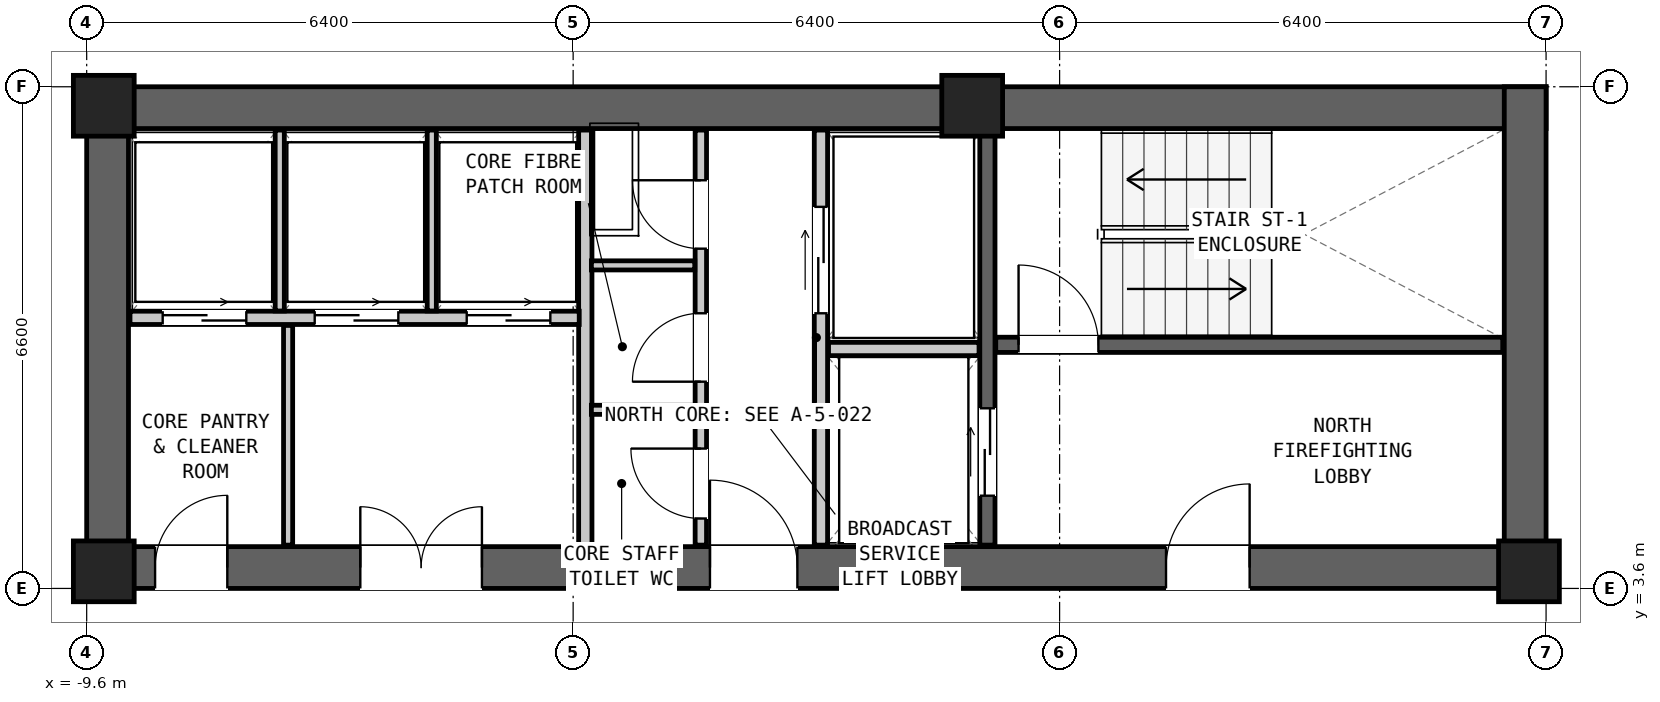
"""IFC4 building model, lengths in metres.
Left out: names, types, materials, properties, quantities, classifications, styles, units other than length and angle.
Written with IfcOpenShell. Run it as: python <this file> out.ifc"""

import sys

from ifc_helpers import new_model, si_unit, direction, frame, frame_2d, origin, origin_2d, place, context, subcontext, project, spatial, rectangle, extrude, element, fill, save


model = new_model("IFC4")
c1 = context("Model", 3, precision=1e-05, world=origin(), true_north=direction((0.0, 1.0)))
c2 = subcontext(c1, "Body", "Model", "MODEL_VIEW")
j1 = project(units=[si_unit("LENGTHUNIT", "METRE"), si_unit("PLANEANGLEUNIT", "RADIAN")], contexts=[c1])
p1 = place(None, origin())
s1 = spatial("IfcSite", under=j1, at=p1, CompositionType="ELEMENT")
p2 = place(p1, origin())
s2 = spatial("IfcBuilding", under=s1, at=p2, CompositionType="ELEMENT")
p3 = place(p2, frame((0.0, 0.0, 69.45)))
s3 = spatial("IfcBuildingStorey", under=s2, at=p3, CompositionType="ELEMENT", Elevation=69.45)
p4 = place(p3, frame((-9.6, 9.925, 0.0), z_axis=(0.0, 0.0, 1.0), x_axis=(1.0, 0.0, 0.0)))
e1 = element("IfcWall", 1, at=p4, inside=s3, PredefinedType="SHEAR", context=c2, shape_type="SweptSolid", body=[
    extrude(rectangle(XDim=19.2, YDim=0.55, at=frame_2d((9.6, 0.0))), origin(), (0.0, 0.0, 1.0), 3.05),
])
p5 = place(p3, frame((-9.6, 3.875, 0.0), z_axis=(0.0, 0.0, 1.0), x_axis=(1.0, 0.0, 0.0)))
e2 = element("IfcWall", 2, at=p5, inside=s3, PredefinedType="SHEAR", context=c2, shape_type="SweptSolid", body=[
    extrude(rectangle(XDim=19.2, YDim=0.55, at=frame_2d((9.6, 0.0))), origin(), (0.0, 0.0, 1.0), 3.05),
])
p6 = place(p5, frame((14.2, 0.0, 0.0)))
e3 = element("IfcOpeningElement", 3, at=p6, cuts=e2, PredefinedType="OPENING", context=c2, shape_type="SweptSolid", body=[
    extrude(rectangle(XDim=1.1, YDim=2.08, at=frame_2d((0.55, 1.04))), frame((0.0, 0.287, 0.0), z_axis=(0.0, -1.0, 0.0), x_axis=(1.0, 0.0, 0.0)), (0.0, 0.0, 1.0), 0.574),
])
p7 = place(p5, frame((8.2, 0.0, 0.0)))
e4 = element("IfcOpeningElement", 4, at=p7, cuts=e2, PredefinedType="OPENING", context=c2, shape_type="SweptSolid", body=[
    extrude(rectangle(XDim=1.15, YDim=2.1, at=frame_2d((0.575, 1.05))), frame((0.0, 0.287, 0.0), z_axis=(0.0, -1.0, 0.0), x_axis=(1.0, 0.0, 0.0)), (0.0, 0.0, 1.0), 0.574),
])
p8 = place(p5, frame((0.9, 0.0, 0.0)))
e5 = element("IfcOpeningElement", 5, at=p8, cuts=e2, PredefinedType="OPENING", context=c2, shape_type="SweptSolid", body=[
    extrude(rectangle(XDim=0.95, YDim=2.1, at=frame_2d((0.475, 1.05))), frame((0.0, 0.287, 0.0), z_axis=(0.0, -1.0, 0.0), x_axis=(1.0, 0.0, 0.0)), (0.0, 0.0, 1.0), 0.574),
])
p9 = place(p5, frame((3.6, 0.0, 0.0)))
e6 = element("IfcOpeningElement", 6, at=p9, cuts=e2, PredefinedType="OPENING", context=c2, shape_type="SweptSolid", body=[
    extrude(rectangle(XDim=1.6, YDim=2.12, at=frame_2d((0.8, 1.06))), frame((0.0, 0.287, 0.0), z_axis=(0.0, -1.0, 0.0), x_axis=(1.0, 0.0, 0.0)), (0.0, 0.0, 1.0), 0.574),
])
for number, where, z_axis, x_axis in (
    (7, (-9.325, 3.6, 0.0), (0.0, 0.0, 1.0), (0.0, 1.0, 0.0)),
    (8, (9.325, 3.6, 0.0), (0.0, 0.0, 1.0), (0.0, 1.0, 0.0)),
):
    element("IfcWall", number, at=place(p3, frame(where, z_axis=z_axis, x_axis=x_axis)), inside=s3, PredefinedType="SHEAR", context=c2, shape_type="SweptSolid", body=[
        extrude(rectangle(XDim=6.6, YDim=0.55, at=frame_2d((3.3, 0.0))), origin(), (0.0, 0.0, 1.0), 3.05),
    ])
for number, where, z_axis, x_axis in (
    (9, (-9.375, 9.95, 0.0), (0.0, 0.0, 1.0), (1.0, 0.0, 0.0)),
    (10, (2.05, 9.95, 0.0), (0.0, 0.0, 1.0), (1.0, 0.0, 0.0)),
    (11, (-9.375, 3.825, 0.0), (0.0, 0.0, 1.0), (1.0, 0.0, 0.0)),
    (12, (9.375, 3.825, 0.0), (0.0, 0.0, 1.0), (1.0, 0.0, 0.0)),
):
    element("IfcColumn", number, at=place(p3, frame(where, z_axis=z_axis, x_axis=x_axis)), inside=s3, PredefinedType="COLUMN", context=c2, shape_type="SweptSolid", body=[
        extrude(rectangle(XDim=0.8, YDim=0.8, at=origin_2d()), origin(), (0.0, 0.0, 1.0), 3.05),
    ])
p10 = place(p3, frame((2.36, 6.805, 0.0), z_axis=(0.0, 0.0, 1.0), x_axis=(1.0, 0.0, 0.0)))
e13 = element("IfcWall", 13, at=p10, inside=s3, PredefinedType="SHEAR", context=c2, shape_type="SweptSolid", body=[
    extrude(rectangle(XDim=6.67, YDim=0.2, at=frame_2d((3.335, 0.0))), origin(), (0.0, 0.0, 1.0), 2.83),
])
p11 = place(p10, frame((0.3, 0.0, 0.0)))
e14 = element("IfcOpeningElement", 14, at=p11, cuts=e13, PredefinedType="OPENING", context=c2, shape_type="SweptSolid", body=[
    extrude(rectangle(XDim=1.05, YDim=2.08, at=frame_2d((0.525, 1.04))), frame((0.0, 0.112, 0.0), z_axis=(0.0, -1.0, 0.0), x_axis=(1.0, 0.0, 0.0)), (0.0, 0.0, 1.0), 0.224),
])
p12 = place(p3, frame((2.25, 4.17, 0.0), z_axis=(0.0, 0.0, 1.0), x_axis=(0.0, 1.0, 0.0)))
e15 = element("IfcWall", 15, at=p12, inside=s3, PredefinedType="SHEAR", context=c2, shape_type="SweptSolid", body=[
    extrude(rectangle(XDim=5.46, YDim=0.2, at=frame_2d((2.73, 0.0))), origin(), (0.0, 0.0, 1.0), 2.83),
])
p13 = place(p12, frame((0.65, 0.0, 0.0)))
e16 = element("IfcOpeningElement", 16, at=p13, cuts=e15, PredefinedType="OPENING", context=c2, shape_type="SweptSolid", body=[
    extrude(rectangle(XDim=1.15, YDim=2.08, at=frame_2d((0.575, 1.04))), frame((0.0, 0.112, 0.0), z_axis=(0.0, -1.0, 0.0), x_axis=(1.0, 0.0, 0.0)), (0.0, 0.0, 1.0), 0.224),
])
p14 = place(p3, frame((0.06, 4.17, 0.0), z_axis=(0.0, 0.0, 1.0), x_axis=(0.0, 1.0, 0.0)))
e17 = element("IfcWall", 17, at=p14, inside=s3, PredefinedType="PARTITIONING", context=c2, shape_type="SweptSolid", body=[
    extrude(rectangle(XDim=5.46, YDim=0.175, at=frame_2d((2.73, 0.0))), origin(), (0.0, 0.0, 1.0), 2.83),
])
p15 = place(p14, frame((3.05, 0.0, 0.0)))
e18 = element("IfcOpeningElement", 18, at=p15, cuts=e17, PredefinedType="OPENING", context=c2, shape_type="SweptSolid", body=[
    extrude(rectangle(XDim=1.4, YDim=2.12, at=frame_2d((0.7, 1.06))), frame((0.0, 0.1, 0.0), z_axis=(0.0, -1.0, 0.0), x_axis=(1.0, 0.0, 0.0)), (0.0, 0.0, 1.0), 0.199),
])
p16 = place(p3, frame((0.16, 6.75, 0.0), z_axis=(0.0, 0.0, 1.0), x_axis=(1.0, 0.0, 0.0)))
e19 = element("IfcWall", 19, at=p16, inside=s3, PredefinedType="PARTITIONING", context=c2, shape_type="SweptSolid", body=[
    extrude(rectangle(XDim=1.98, YDim=0.175, at=frame_2d((0.99, 0.0))), origin(), (0.0, 0.0, 1.0), 2.83),
])
p17 = place(p3, frame((-3.04, 4.17, 0.0), z_axis=(0.0, 0.0, 1.0), x_axis=(0.0, 1.0, 0.0)))
e20 = element("IfcWall", 20, at=p17, inside=s3, PredefinedType="PARTITIONING", context=c2, shape_type="SweptSolid", body=[
    extrude(rectangle(XDim=5.46, YDim=0.175, at=frame_2d((2.73, 0.0))), origin(), (0.0, 0.0, 1.0), 2.83),
])
p18 = place(p3, frame((-1.52, 4.17, 0.0), z_axis=(0.0, 0.0, 1.0), x_axis=(0.0, 1.0, 0.0)))
e21 = element("IfcWall", 21, at=p18, inside=s3, PredefinedType="PARTITIONING", context=c2, shape_type="SweptSolid", body=[
    extrude(rectangle(XDim=5.46, YDim=0.15, at=frame_2d((2.73, 0.0))), origin(), (0.0, 0.0, 1.0), 2.83),
])
p19 = place(p18, frame((3.9, 0.0, 0.0)))
e22 = element("IfcOpeningElement", 22, at=p19, cuts=e21, PredefinedType="OPENING", context=c2, shape_type="SweptSolid", body=[
    extrude(rectangle(XDim=0.9, YDim=2.05, at=frame_2d((0.45, 1.025))), frame((0.0, 0.087, 0.0), z_axis=(0.0, -1.0, 0.0), x_axis=(1.0, 0.0, 0.0)), (0.0, 0.0, 1.0), 0.174),
])
p20 = place(p18, frame((2.15, 0.0, 0.0)))
e23 = element("IfcOpeningElement", 23, at=p20, cuts=e21, PredefinedType="OPENING", context=c2, shape_type="SweptSolid", body=[
    extrude(rectangle(XDim=0.9, YDim=2.05, at=frame_2d((0.45, 1.025))), frame((0.0, 0.087, 0.0), z_axis=(0.0, -1.0, 0.0), x_axis=(1.0, 0.0, 0.0)), (0.0, 0.0, 1.0), 0.174),
])
p21 = place(p18, frame((0.35, 0.0, 0.0)))
e24 = element("IfcOpeningElement", 24, at=p21, cuts=e21, PredefinedType="OPENING", context=c2, shape_type="SweptSolid", body=[
    extrude(rectangle(XDim=0.92, YDim=2.1, at=frame_2d((0.46, 1.05))), frame((0.0, 0.087, 0.0), z_axis=(0.0, -1.0, 0.0), x_axis=(1.0, 0.0, 0.0)), (0.0, 0.0, 1.0), 0.174),
])
for number, where, z_axis, x_axis in (
    (25, (-2.96, 5.95, 0.0), (0.0, 0.0, 1.0), (1.0, 0.0, 0.0)),
    (26, (-2.96, 7.85, 0.0), (0.0, 0.0, 1.0), (1.0, 0.0, 0.0)),
):
    element("IfcWall", number, at=place(p3, frame(where, z_axis=z_axis, x_axis=x_axis)), inside=s3, PredefinedType="PARTITIONING", context=c2, shape_type="SweptSolid", body=[
        extrude(rectangle(XDim=1.36, YDim=0.12, at=frame_2d((0.68, 0.0))), origin(), (0.0, 0.0, 1.0), 2.83),
    ])
p22 = place(p3, frame((-9.03, 7.16, 0.0), z_axis=(0.0, 0.0, 1.0), x_axis=(1.0, 0.0, 0.0)))
e27 = element("IfcWall", 27, at=p22, inside=s3, PredefinedType="PARTITIONING", context=c2, shape_type="SweptSolid", body=[
    extrude(rectangle(XDim=5.91, YDim=0.175, at=frame_2d((2.955, 0.0))), origin(), (0.0, 0.0, 1.0), 2.83),
])
p23 = place(p22, frame((0.43, 0.0, 0.0)))
e28 = element("IfcOpeningElement", 28, at=p23, cuts=e27, PredefinedType="OPENING", context=c2, shape_type="SweptSolid", body=[
    extrude(rectangle(XDim=1.1, YDim=2.06, at=frame_2d((0.55, 1.03))), frame((0.0, 0.1, 0.0), z_axis=(0.0, -1.0, 0.0), x_axis=(1.0, 0.0, 0.0)), (0.0, 0.0, 1.0), 0.199),
])
p24 = place(p22, frame((2.43, 0.0, 0.0)))
e29 = element("IfcOpeningElement", 29, at=p24, cuts=e27, PredefinedType="OPENING", context=c2, shape_type="SweptSolid", body=[
    extrude(rectangle(XDim=1.1, YDim=2.06, at=frame_2d((0.55, 1.03))), frame((0.0, 0.1, 0.0), z_axis=(0.0, -1.0, 0.0), x_axis=(1.0, 0.0, 0.0)), (0.0, 0.0, 1.0), 0.199),
])
p25 = place(p22, frame((4.43, 0.0, 0.0)))
e30 = element("IfcOpeningElement", 30, at=p25, cuts=e27, PredefinedType="OPENING", context=c2, shape_type="SweptSolid", body=[
    extrude(rectangle(XDim=1.1, YDim=2.06, at=frame_2d((0.55, 1.03))), frame((0.0, 0.1, 0.0), z_axis=(0.0, -1.0, 0.0), x_axis=(1.0, 0.0, 0.0)), (0.0, 0.0, 1.0), 0.199),
])
for number, where, z_axis, x_axis in (
    (31, (-7.06, 7.25, 0.0), (0.0, 0.0, 1.0), (0.0, 1.0, 0.0)),
    (32, (-5.06, 7.25, 0.0), (0.0, 0.0, 1.0), (0.0, 1.0, 0.0)),
):
    element("IfcWall", number, at=place(p3, frame(where, z_axis=z_axis, x_axis=x_axis)), inside=s3, PredefinedType="PARTITIONING", context=c2, shape_type="SweptSolid", body=[
        extrude(rectangle(XDim=2.38, YDim=0.12, at=frame_2d((1.19, 0.0))), origin(), (0.0, 0.0, 1.0), 2.83),
    ])
p26 = place(p3, frame((-6.95, 4.17, 0.0), z_axis=(0.0, 0.0, 1.0), x_axis=(0.0, 1.0, 0.0)))
e33 = element("IfcWall", 33, at=p26, inside=s3, PredefinedType="PARTITIONING", context=c2, shape_type="SweptSolid", body=[
    extrude(rectangle(XDim=2.89, YDim=0.12, at=frame_2d((1.445, 0.0))), origin(), (0.0, 0.0, 1.0), 2.83),
])
p27 = place(p11, origin())
e34 = element("IfcDoor", 34, at=p27, inside=s3, OperationType="SINGLE_SWING_LEFT", PredefinedType="DOOR", context=c2, shape_type="SweptSolid", body=[
    extrude(rectangle(XDim=1.05, YDim=2.08, at=frame_2d((0.525, 1.04))), frame((0.0, 0.025, 0.0), z_axis=(0.0, -1.0, 0.0), x_axis=(1.0, 0.0, 0.0)), (0.0, 0.0, 1.0), 0.05),
])
fill(e14, e34)
p28 = place(p6, origin())
e35 = element("IfcDoor", 35, at=p28, inside=s3, OperationType="SINGLE_SWING_RIGHT", PredefinedType="DOOR", context=c2, shape_type="SweptSolid", body=[
    extrude(rectangle(XDim=1.1, YDim=2.08, at=frame_2d((0.55, 1.04))), frame((0.0, 0.025, 0.0), z_axis=(0.0, -1.0, 0.0), x_axis=(1.0, 0.0, 0.0)), (0.0, 0.0, 1.0), 0.05),
])
fill(e3, e35)
p29 = place(p13, origin())
e36 = element("IfcDoor", 36, at=p29, inside=s3, OperationType="DOUBLE_DOOR_SLIDING", PredefinedType="DOOR", context=c2, shape_type="SweptSolid", body=[
    extrude(rectangle(XDim=1.15, YDim=2.08, at=frame_2d((0.575, 1.04))), frame((0.0, 0.025, 0.0), z_axis=(0.0, -1.0, 0.0), x_axis=(1.0, 0.0, 0.0)), (0.0, 0.0, 1.0), 0.05),
])
fill(e16, e36)
p30 = place(p15, origin())
e37 = element("IfcDoor", 37, at=p30, inside=s3, OperationType="DOUBLE_DOOR_SLIDING", PredefinedType="DOOR", context=c2, shape_type="SweptSolid", body=[
    extrude(rectangle(XDim=1.4, YDim=2.12, at=frame_2d((0.7, 1.06))), frame((0.0, 0.025, 0.0), z_axis=(0.0, -1.0, 0.0), x_axis=(1.0, 0.0, 0.0)), (0.0, 0.0, 1.0), 0.05),
])
fill(e18, e37)
p31 = place(p7, origin())
e38 = element("IfcDoor", 38, at=p31, inside=s3, OperationType="SINGLE_SWING_LEFT", PredefinedType="DOOR", context=c2, shape_type="SweptSolid", body=[
    extrude(rectangle(XDim=1.15, YDim=2.1, at=frame_2d((0.575, 1.05))), frame((0.0, 0.025, 0.0), z_axis=(0.0, -1.0, 0.0), x_axis=(1.0, 0.0, 0.0)), (0.0, 0.0, 1.0), 0.05),
])
fill(e4, e38)
p32 = place(p19, origin())
e39 = element("IfcDoor", 39, at=p32, inside=s3, OperationType="SINGLE_SWING_RIGHT", PredefinedType="DOOR", context=c2, shape_type="SweptSolid", body=[
    extrude(rectangle(XDim=0.9, YDim=2.05, at=frame_2d((0.45, 1.025))), frame((0.0, 0.025, 0.0), z_axis=(0.0, -1.0, 0.0), x_axis=(1.0, 0.0, 0.0)), (0.0, 0.0, 1.0), 0.05),
])
fill(e22, e39)
p33 = place(p20, origin())
e40 = element("IfcDoor", 40, at=p33, inside=s3, OperationType="SINGLE_SWING_LEFT", PredefinedType="DOOR", context=c2, shape_type="SweptSolid", body=[
    extrude(rectangle(XDim=0.9, YDim=2.05, at=frame_2d((0.45, 1.025))), frame((0.0, 0.025, 0.0), z_axis=(0.0, -1.0, 0.0), x_axis=(1.0, 0.0, 0.0)), (0.0, 0.0, 1.0), 0.05),
])
fill(e23, e40)
p34 = place(p21, origin())
e41 = element("IfcDoor", 41, at=p34, inside=s3, OperationType="SINGLE_SWING_RIGHT", PredefinedType="DOOR", context=c2, shape_type="SweptSolid", body=[
    extrude(rectangle(XDim=0.92, YDim=2.1, at=frame_2d((0.46, 1.05))), frame((0.0, 0.025, 0.0), z_axis=(0.0, -1.0, 0.0), x_axis=(1.0, 0.0, 0.0)), (0.0, 0.0, 1.0), 0.05),
])
fill(e24, e41)
p35 = place(p23, origin())
e42 = element("IfcDoor", 42, at=p35, inside=s3, OperationType="DOUBLE_DOOR_SLIDING", PredefinedType="DOOR", context=c2, shape_type="SweptSolid", body=[
    extrude(rectangle(XDim=1.1, YDim=2.06, at=frame_2d((0.55, 1.03))), frame((0.0, 0.025, 0.0), z_axis=(0.0, -1.0, 0.0), x_axis=(1.0, 0.0, 0.0)), (0.0, 0.0, 1.0), 0.05),
])
fill(e28, e42)
p36 = place(p24, origin())
e43 = element("IfcDoor", 43, at=p36, inside=s3, OperationType="DOUBLE_DOOR_SLIDING", PredefinedType="DOOR", context=c2, shape_type="SweptSolid", body=[
    extrude(rectangle(XDim=1.1, YDim=2.06, at=frame_2d((0.55, 1.03))), frame((0.0, 0.025, 0.0), z_axis=(0.0, -1.0, 0.0), x_axis=(1.0, 0.0, 0.0)), (0.0, 0.0, 1.0), 0.05),
])
fill(e29, e43)
p37 = place(p25, origin())
e44 = element("IfcDoor", 44, at=p37, inside=s3, OperationType="DOUBLE_DOOR_SLIDING", PredefinedType="DOOR", context=c2, shape_type="SweptSolid", body=[
    extrude(rectangle(XDim=1.1, YDim=2.06, at=frame_2d((0.55, 1.03))), frame((0.0, 0.025, 0.0), z_axis=(0.0, -1.0, 0.0), x_axis=(1.0, 0.0, 0.0)), (0.0, 0.0, 1.0), 0.05),
])
fill(e30, e44)
p38 = place(p8, origin())
e45 = element("IfcDoor", 45, at=p38, inside=s3, OperationType="SINGLE_SWING_RIGHT", PredefinedType="DOOR", context=c2, shape_type="SweptSolid", body=[
    extrude(rectangle(XDim=0.95, YDim=2.1, at=frame_2d((0.475, 1.05))), frame((0.0, 0.025, 0.0), z_axis=(0.0, -1.0, 0.0), x_axis=(1.0, 0.0, 0.0)), (0.0, 0.0, 1.0), 0.05),
])
fill(e5, e45)
p39 = place(p9, origin())
e46 = element("IfcDoor", 46, at=p39, inside=s3, OperationType="DOUBLE_DOOR_SINGLE_SWING", PredefinedType="DOOR", context=c2, shape_type="SweptSolid", body=[
    extrude(rectangle(XDim=1.6, YDim=2.12, at=frame_2d((0.8, 1.06))), frame((0.0, 0.025, 0.0), z_axis=(0.0, -1.0, 0.0), x_axis=(1.0, 0.0, 0.0)), (0.0, 0.0, 1.0), 0.05),
])
fill(e6, e46)
save(model, sys.argv[1])
